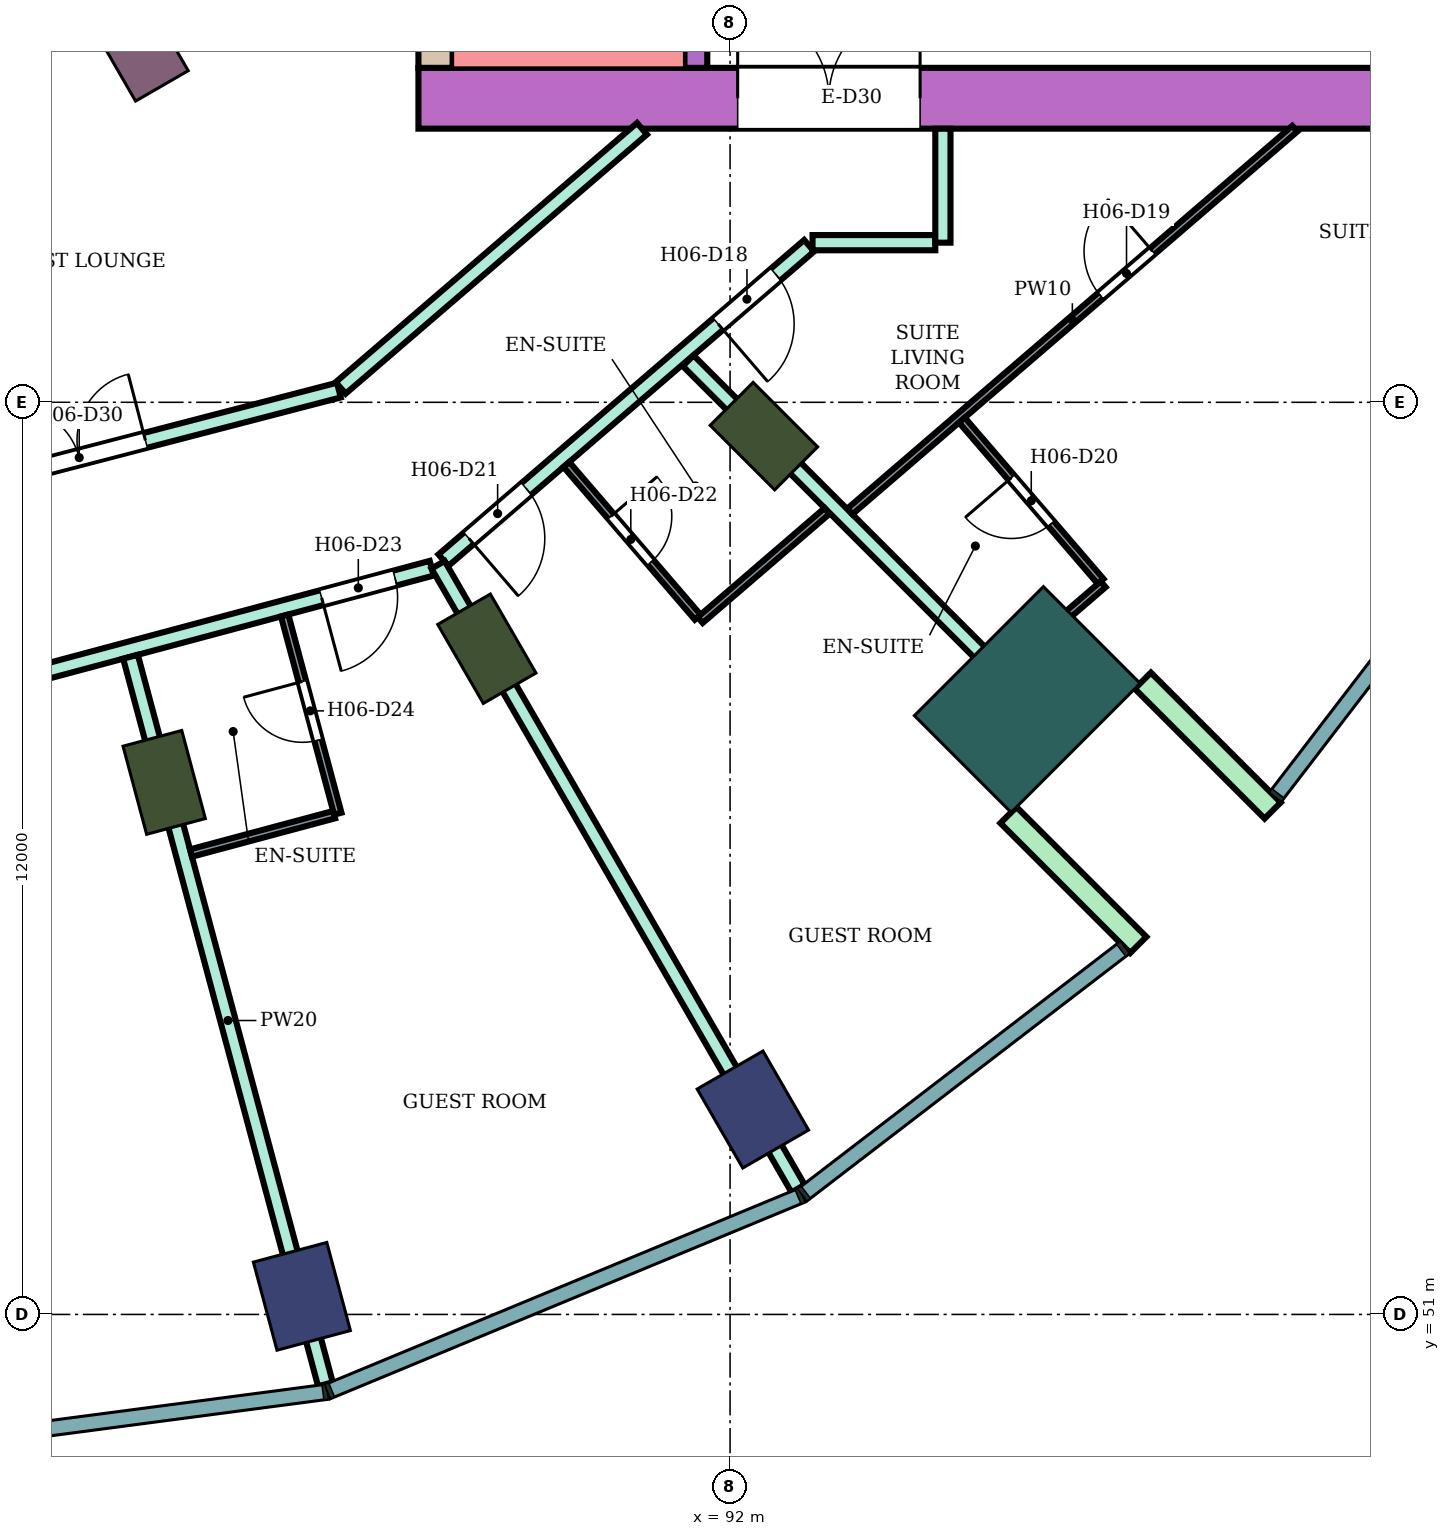
"""IFC4 building model, lengths in metres.
Left out: names, types, materials, properties, quantities, classifications, styles, units other than length and angle.
Written with IfcOpenShell. Run it as: python <this file> out.ifc"""

import sys

from ifc_helpers import new_model, si_unit, direction, frame, frame_2d, origin, origin_2d, place, context, subcontext, project, spatial, rectangle, extrude, element, fill, save


model = new_model("IFC4")
c1 = context("Model", 3, precision=1e-05, world=origin(), true_north=direction((0.0, 1.0)))
c2 = subcontext(c1, "Body", "Model", "MODEL_VIEW")
j1 = project(units=[si_unit("LENGTHUNIT", "METRE"), si_unit("PLANEANGLEUNIT", "RADIAN")], contexts=[c1])
p1 = place(None, origin())
s1 = spatial("IfcSite", under=j1, at=p1, CompositionType="ELEMENT")
p2 = place(p1, origin())
s2 = spatial("IfcBuilding", under=s1, at=p2, CompositionType="ELEMENT")
p3 = place(p2, frame((0.0, 0.0, 93.8)))
s3 = spatial("IfcBuildingStorey", under=s2, at=p3, CompositionType="ELEMENT", Elevation=93.8)
for number, where, z_axis, x_axis in (
    (1, (86.367, 51.238, 0.0), (0.0, 0.0, 1.0), (0.259, -0.966, 0.0)),
    (2, (92.3, 53.696, 0.0), (0.0, 0.0, 1.0), (0.5, -0.866, 0.0)),
):
    element("IfcColumn", number, at=place(p3, frame(where, z_axis=z_axis, x_axis=x_axis)), inside=s3, PredefinedType="COLUMN", context=c2, shape_type="SweptSolid", body=[
        extrude(rectangle(XDim=1.2, YDim=1.0, at=origin_2d()), origin(), (0.0, 0.0, 1.0), 3.8),
    ])
for number, where, z_axis, x_axis in (
    (3, (84.555, 58.0, 0.0), (0.0, 0.0, 1.0), (0.259, -0.966, 0.0)),
    (4, (88.8, 59.758, 0.0), (0.0, 0.0, 1.0), (0.5, -0.866, 0.0)),
    (5, (92.445, 62.555, 0.0), (0.0, 0.0, 1.0), (0.707, -0.707, 0.0)),
):
    element("IfcColumn", number, at=place(p3, frame(where, z_axis=z_axis, x_axis=x_axis)), inside=s3, PredefinedType="COLUMN", context=c2, shape_type="SweptSolid", body=[
        extrude(rectangle(XDim=1.2, YDim=0.8, at=origin_2d()), origin(), (0.0, 0.0, 1.0), 3.8),
    ])
p4 = place(p3, frame((84.3, 67.552, 0.0), z_axis=(0.0, 0.0, 1.0), x_axis=(0.5, -0.866025403784, 0.0)))
e6 = element("IfcColumn", 6, at=p4, inside=s3, PredefinedType="COLUMN", context=c2, shape_type="SweptSolid", body=[
    extrude(rectangle(XDim=0.9, YDim=0.8, at=origin_2d()), origin(), (0.0, 0.0, 1.0), 3.8),
])
p5 = place(p3, frame((95.91, 59.09, 0.0), z_axis=(0.0, 0.0, 1.0), x_axis=(0.707106781187, -0.707106781187, 0.0)))
e7 = element("IfcColumn", 7, at=p5, inside=s3, PredefinedType="COLUMN", context=c2, shape_type="SweptSolid", body=[
    extrude(rectangle(XDim=1.8, YDim=2.4, at=origin_2d()), origin(), (0.0, 0.0, 1.0), 3.8),
])
p6 = place(p3, frame((87.9, 67.0, 0.0), z_axis=(0.0, 0.0, 1.0), x_axis=(1.0, 0.0, 0.0)))
e8 = element("IfcWall", 8, at=p6, inside=s3, PredefinedType="SHEAR", context=c2, shape_type="SweptSolid", body=[
    extrude(rectangle(XDim=14.7, YDim=0.8, at=frame_2d((7.35, 0.0))), origin(), (0.0, 0.0, 1.0), 3.48),
])
p7 = place(p6, frame((4.2, 0.0, 0.0)))
e9 = element("IfcOpeningElement", 9, at=p7, cuts=e8, PredefinedType="OPENING", context=c2, shape_type="SweptSolid", body=[
    extrude(rectangle(XDim=2.4, YDim=2.4, at=frame_2d((1.2, 1.2))), frame((0.0, 0.41, 0.0), z_axis=(0.0, -1.0, 0.0), x_axis=(1.0, 0.0, 0.0)), (0.0, 0.0, 1.0), 0.82),
])
p8 = place(p3, frame((88.125, 67.4, 0.0), z_axis=(0.0, 0.0, 1.0), x_axis=(0.0, 1.0, 0.0)))
e10 = element("IfcWall", 10, at=p8, inside=s3, PredefinedType="SHEAR", context=c2, shape_type="SweptSolid", body=[
    extrude(rectangle(XDim=7.6, YDim=0.45, at=frame_2d((3.8, 0.0))), origin(), (0.0, 0.0, 1.0), 3.48),
])
p9 = place(p3, frame((91.55, 67.4, 0.0), z_axis=(0.0, 0.0, 1.0), x_axis=(0.0, 1.0, 0.0)))
e11 = element("IfcWall", 11, at=p9, inside=s3, PredefinedType="SHEAR", context=c2, shape_type="SweptSolid", body=[
    extrude(rectangle(XDim=7.6, YDim=0.3, at=frame_2d((3.8, 0.0))), origin(), (0.0, 0.0, 1.0), 3.48),
])
p10 = place(p9, frame((0.25, 0.0, 0.0)))
e12 = element("IfcOpeningElement", 12, at=p10, cuts=e11, PredefinedType="OPENING", context=c2, shape_type="SweptSolid", body=[
    extrude(rectangle(XDim=0.9, YDim=2.1, at=frame_2d((0.45, 1.05))), frame((0.0, 0.16, 0.0), z_axis=(0.0, -1.0, 0.0), x_axis=(1.0, 0.0, 0.0)), (0.0, 0.0, 1.0), 0.32),
])
for number, where, z_axis, x_axis in (
    (13, (95.662, 57.57, 0.0), (0.0, 0.0, 1.0), (0.707, -0.707, 0.0)),
    (14, (97.43, 59.338, 0.0), (0.0, 0.0, 1.0), (0.707, -0.707, 0.0)),
):
    element("IfcWall", number, at=place(p3, frame(where, z_axis=z_axis, x_axis=x_axis)), inside=s3, PredefinedType="NOTDEFINED", context=c2, shape_type="SweptSolid", body=[
        extrude(rectangle(XDim=2.416, YDim=0.3, at=frame_2d((1.208, 0.0))), origin(), (0.0, 0.0, 1.0), 3.8),
    ])
p11 = place(p3, frame((80.0, 67.396, 0.0), z_axis=(0.0, 0.0, 1.0), x_axis=(0.965933654434, 0.258789828301, 0.0)))
e15 = element("IfcWall", 15, at=p11, inside=s3, PredefinedType="NOTDEFINED", context=c2, shape_type="SweptSolid", body=[
    extrude(rectangle(XDim=3.936, YDim=0.2, at=frame_2d((1.968, 0.0))), origin(), (0.0, 0.0, 1.0), 3.8),
])
p12 = place(p11, frame((0.468, 0.0, 0.9)))
e16 = element("IfcOpeningElement", 16, at=p12, cuts=e15, PredefinedType="OPENING", context=c2, shape_type="SweptSolid", body=[
    extrude(rectangle(XDim=3.0, YDim=2.3, at=frame_2d((1.5, 1.15))), frame((0.0, 0.11, 0.0), z_axis=(0.0, -1.0, 0.0), x_axis=(1.0, 0.0, 0.0)), (0.0, 0.0, 1.0), 0.22),
])
p13 = place(p3, frame((80.119, 61.41, 0.0), z_axis=(0.0, 0.0, 1.0), x_axis=(0.967823361235, 0.251630565408, 0.0)))
e17 = element("IfcWall", 17, at=p13, inside=s3, PredefinedType="PARTITIONING", context=c2, shape_type="SweptSolid", body=[
    extrude(rectangle(XDim=6.958, YDim=0.2, at=frame_2d((3.479, 0.0))), origin(), (0.0, 0.0, 1.0), 3.35),
])
p14 = place(p13, frame((2.529, 0.0, 0.0)))
e18 = element("IfcOpeningElement", 18, at=p14, cuts=e17, PredefinedType="OPENING", context=c2, shape_type="SweptSolid", body=[
    extrude(rectangle(XDim=1.8, YDim=2.1, at=frame_2d((0.9, 1.05))), frame((0.0, 0.11, 0.0), z_axis=(0.0, -1.0, 0.0), x_axis=(1.0, 0.0, 0.0)), (0.0, 0.0, 1.0), 0.22),
])
p15 = place(p3, frame((80.0, 58.655, 0.0), z_axis=(0.0, 0.0, 1.0), x_axis=(0.965967338894, 0.258664068224, 0.0)))
e19 = element("IfcWall", 19, at=p15, inside=s3, PredefinedType="PARTITIONING", context=c2, shape_type="SweptSolid", body=[
    extrude(rectangle(XDim=8.36, YDim=0.2, at=frame_2d((4.18, 0.0))), origin(), (0.0, 0.0, 1.0), 3.35),
])
p16 = place(p15, frame((6.86, 0.0, 0.0)))
e20 = element("IfcOpeningElement", 20, at=p16, cuts=e19, PredefinedType="OPENING", context=c2, shape_type="SweptSolid", body=[
    extrude(rectangle(XDim=1.0, YDim=2.1, at=frame_2d((0.5, 1.05))), frame((0.0, 0.11, 0.0), z_axis=(0.0, -1.0, 0.0), x_axis=(1.0, 0.0, 0.0)), (0.0, 0.0, 1.0), 0.22),
])
p17 = place(p3, frame((84.112, 59.652, 0.0), z_axis=(0.0, 0.0, 1.0), x_axis=(0.258792739659, -0.965932874428, 0.0)))
e21 = element("IfcWall", 21, at=p17, inside=s3, PredefinedType="PARTITIONING", context=c2, shape_type="SweptSolid", body=[
    extrude(rectangle(XDim=9.908, YDim=0.2, at=frame_2d((4.954, 0.0))), origin(), (0.0, 0.0, 1.0), 3.35),
])
p18 = place(p3, frame((86.877, 63.189, 0.0), z_axis=(0.0, 0.0, 1.0), x_axis=(0.758088707506, 0.652151448325, 0.0)))
e22 = element("IfcWall", 22, at=p18, inside=s3, PredefinedType="PARTITIONING", context=c2, shape_type="SweptSolid", body=[
    extrude(rectangle(XDim=5.229, YDim=0.2, at=frame_2d((2.615, 0.0))), origin(), (0.0, 0.0, 1.0), 3.35),
])
p19 = place(p3, frame((88.229, 60.923, 0.0), z_axis=(0.0, 0.0, 1.0), x_axis=(0.758220952094, 0.651997690031, 0.0)))
e23 = element("IfcWall", 23, at=p19, inside=s3, PredefinedType="PARTITIONING", context=c2, shape_type="SweptSolid", body=[
    extrude(rectangle(XDim=6.346, YDim=0.2, at=frame_2d((3.173, 0.0))), origin(), (0.0, 0.0, 1.0), 3.35),
])
p20 = place(p19, frame((4.767, 0.0, 0.0)))
e24 = element("IfcOpeningElement", 24, at=p20, cuts=e23, PredefinedType="OPENING", context=c2, shape_type="SweptSolid", body=[
    extrude(rectangle(XDim=1.0, YDim=2.1, at=frame_2d((0.5, 1.05))), frame((0.0, 0.11, 0.0), z_axis=(0.0, -1.0, 0.0), x_axis=(1.0, 0.0, 0.0)), (0.0, 0.0, 1.0), 0.22),
])
p21 = place(p19, frame((0.44, 0.0, 0.0)))
e25 = element("IfcOpeningElement", 25, at=p21, cuts=e23, PredefinedType="OPENING", context=c2, shape_type="SweptSolid", body=[
    extrude(rectangle(XDim=1.0, YDim=2.1, at=frame_2d((0.5, 1.05))), frame((0.0, 0.11, 0.0), z_axis=(0.0, -1.0, 0.0), x_axis=(1.0, 0.0, 0.0)), (0.0, 0.0, 1.0), 0.22),
])
p22 = place(p3, frame((88.158, 60.862, 0.0), z_axis=(0.0, 0.0, 1.0), x_axis=(0.499916512745, -0.866073599808, 0.0)))
e26 = element("IfcWall", 26, at=p22, inside=s3, PredefinedType="PARTITIONING", context=c2, shape_type="SweptSolid", body=[
    extrude(rectangle(XDim=9.475, YDim=0.2, at=frame_2d((4.737, 0.0))), origin(), (0.0, 0.0, 1.0), 3.35),
])
p23 = place(p3, frame((91.448, 63.547, 0.0), z_axis=(0.0, 0.0, 1.0), x_axis=(0.706949958062, -0.707263569538, 0.0)))
e27 = element("IfcWall", 27, at=p23, inside=s3, PredefinedType="PARTITIONING", context=c2, shape_type="SweptSolid", body=[
    extrude(rectangle(XDim=7.006, YDim=0.2, at=frame_2d((3.503, 0.0))), origin(), (0.0, 0.0, 1.0), 3.35),
])
p24 = place(p3, frame((93.085, 65.1, 0.0), z_axis=(0.0, 0.0, 1.0), x_axis=(1.0, 0.0, 0.0)))
e28 = element("IfcWall", 28, at=p24, inside=s3, PredefinedType="PARTITIONING", context=c2, shape_type="SweptSolid", body=[
    extrude(rectangle(XDim=1.615, YDim=0.2, at=frame_2d((0.808, 0.0))), origin(), (0.0, 0.0, 1.0), 3.35),
])
p25 = place(p3, frame((94.8, 65.1, 0.0), z_axis=(0.0, 0.0, 1.0), x_axis=(0.0, 1.0, 0.0)))
e29 = element("IfcWall", 29, at=p25, inside=s3, PredefinedType="PARTITIONING", context=c2, shape_type="SweptSolid", body=[
    extrude(rectangle(XDim=1.499, YDim=0.2, at=frame_2d((0.75, 0.0))), origin(), (0.0, 0.0, 1.0), 3.35),
])
p26 = place(p3, frame((84.908, 57.07, 0.0), z_axis=(0.0, 0.0, 1.0), x_axis=(0.965853538138, 0.25908867761, 0.0)))
e30 = element("IfcWall", 30, at=p26, inside=s3, PredefinedType="PARTITIONING", context=c2, shape_type="SweptSolid", body=[
    extrude(rectangle(XDim=1.95, YDim=0.1, at=frame_2d((0.975, 0.0))), origin(), (0.0, 0.0, 1.0), 3.35),
])
p27 = place(p3, frame((86.14, 60.196, 0.0), z_axis=(0.0, 0.0, 1.0), x_axis=(0.258945475746, -0.965891940432, 0.0)))
e31 = element("IfcWall", 31, at=p27, inside=s3, PredefinedType="PARTITIONING", context=c2, shape_type="SweptSolid", body=[
    extrude(rectangle(XDim=2.7, YDim=0.1, at=frame_2d((1.35, 0.0))), origin(), (0.0, 0.0, 1.0), 3.35),
])
p28 = place(p27, frame((0.9, 0.0, 0.0)))
e32 = element("IfcOpeningElement", 32, at=p28, cuts=e31, PredefinedType="OPENING", context=c2, shape_type="SweptSolid", body=[
    extrude(rectangle(XDim=0.8, YDim=2.1, at=frame_2d((0.4, 1.05))), frame((0.0, 0.06, 0.0), z_axis=(0.0, -1.0, 0.0), x_axis=(1.0, 0.0, 0.0)), (0.0, 0.0, 1.0), 0.12),
])
p29 = place(p3, frame((89.846, 62.182, 0.0), z_axis=(0.0, 0.0, 1.0), x_axis=(0.652095405055, -0.758136915541, 0.0)))
e33 = element("IfcWall", 33, at=p29, inside=s3, PredefinedType="PARTITIONING", context=c2, shape_type="SweptSolid", body=[
    extrude(rectangle(XDim=2.65, YDim=0.1, at=frame_2d((1.325, 0.0))), origin(), (0.0, 0.0, 1.0), 3.35),
])
p30 = place(p29, frame((0.9, 0.0, 0.0)))
e34 = element("IfcOpeningElement", 34, at=p30, cuts=e33, PredefinedType="OPENING", context=c2, shape_type="SweptSolid", body=[
    extrude(rectangle(XDim=0.8, YDim=2.1, at=frame_2d((0.4, 1.05))), frame((0.0, 0.06, 0.0), z_axis=(0.0, -1.0, 0.0), x_axis=(1.0, 0.0, 0.0)), (0.0, 0.0, 1.0), 0.12),
])
p31 = place(p3, frame((91.607, 60.135, 0.0), z_axis=(0.0, 0.0, 1.0), x_axis=(0.758135842672, 0.652096652388, 0.0)))
e35 = element("IfcWall", 35, at=p31, inside=s3, PredefinedType="PARTITIONING", context=c2, shape_type="SweptSolid", body=[
    extrude(rectangle(XDim=2.201, YDim=0.1, at=frame_2d((1.101, 0.0))), origin(), (0.0, 0.0, 1.0), 3.35),
])
p32 = place(p3, frame((93.577, 61.565, 0.0), z_axis=(0.0, 0.0, 1.0), x_axis=(0.75812140399, 0.652113438607, 0.0)))
e36 = element("IfcWall", 36, at=p32, inside=s3, PredefinedType="PARTITIONING", context=c2, shape_type="SweptSolid", body=[
    extrude(rectangle(XDim=7.72, YDim=0.1, at=frame_2d((3.86, 0.0))), origin(), (0.0, 0.0, 1.0), 3.35),
])
p33 = place(p32, frame((4.35, 0.0, 0.0)))
e37 = element("IfcOpeningElement", 37, at=p33, cuts=e36, PredefinedType="OPENING", context=c2, shape_type="SweptSolid", body=[
    extrude(rectangle(XDim=0.9, YDim=2.1, at=frame_2d((0.45, 1.05))), frame((0.0, 0.06, 0.0), z_axis=(0.0, -1.0, 0.0), x_axis=(1.0, 0.0, 0.0)), (0.0, 0.0, 1.0), 0.12),
])
p34 = place(p3, frame((95.05, 62.766, 0.0), z_axis=(0.0, 0.0, 1.0), x_axis=(0.652190642827, -0.75805498838, 0.0)))
e38 = element("IfcWall", 38, at=p34, inside=s3, PredefinedType="PARTITIONING", context=c2, shape_type="SweptSolid", body=[
    extrude(rectangle(XDim=2.8, YDim=0.1, at=frame_2d((1.4, 0.0))), origin(), (0.0, 0.0, 1.0), 3.35),
])
p35 = place(p34, frame((1.0, 0.0, 0.0)))
e39 = element("IfcOpeningElement", 39, at=p35, cuts=e38, PredefinedType="OPENING", context=c2, shape_type="SweptSolid", body=[
    extrude(rectangle(XDim=0.8, YDim=2.1, at=frame_2d((0.4, 1.05))), frame((0.0, 0.06, 0.0), z_axis=(0.0, -1.0, 0.0), x_axis=(1.0, 0.0, 0.0)), (0.0, 0.0, 1.0), 0.12),
])
p36 = place(p3, frame((95.634, 59.509, 0.0), z_axis=(0.0, 0.0, 1.0), x_axis=(0.757922369717, 0.652344756614, 0.0)))
e40 = element("IfcWall", 40, at=p36, inside=s3, PredefinedType="PARTITIONING", context=c2, shape_type="SweptSolid", body=[
    extrude(rectangle(XDim=1.681, YDim=0.1, at=frame_2d((0.841, 0.0))), origin(), (0.0, 0.0, 1.0), 3.35),
])
p37 = place(p12, origin())
e41 = element("IfcWindow", 41, at=p37, inside=s3, PartitioningType="SINGLE_PANEL", PredefinedType="WINDOW", context=c2, shape_type="SweptSolid", body=[
    extrude(rectangle(XDim=3.0, YDim=2.3, at=frame_2d((1.5, 1.15))), frame((0.0, 0.03, 0.0), z_axis=(0.0, -1.0, 0.0), x_axis=(1.0, 0.0, 0.0)), (0.0, 0.0, 1.0), 0.06),
])
fill(e16, e41)
p38 = place(p20, frame((1.0, 0.0, 0.0), z_axis=(0.0, 0.0, 1.0), x_axis=(-1.0, 0.0, 0.0)))
e42 = element("IfcDoor", 42, at=p38, inside=s3, OperationType="SINGLE_SWING_RIGHT", PredefinedType="DOOR", context=c2, shape_type="SweptSolid", body=[
    extrude(rectangle(XDim=1.0, YDim=2.1, at=frame_2d((0.5, 1.05))), frame((0.0, 0.025, 0.0), z_axis=(0.0, -1.0, 0.0), x_axis=(1.0, 0.0, 0.0)), (0.0, 0.0, 1.0), 0.05),
])
fill(e24, e42)
p39 = place(p33, origin())
e43 = element("IfcDoor", 43, at=p39, inside=s3, OperationType="SINGLE_SWING_RIGHT", PredefinedType="DOOR", context=c2, shape_type="SweptSolid", body=[
    extrude(rectangle(XDim=0.9, YDim=2.1, at=frame_2d((0.45, 1.05))), frame((0.0, 0.025, 0.0), z_axis=(0.0, -1.0, 0.0), x_axis=(1.0, 0.0, 0.0)), (0.0, 0.0, 1.0), 0.05),
])
fill(e37, e43)
p40 = place(p35, frame((0.8, 0.0, 0.0), z_axis=(0.0, 0.0, 1.0), x_axis=(-1.0, 0.0, 0.0)))
e44 = element("IfcDoor", 44, at=p40, inside=s3, OperationType="SINGLE_SWING_RIGHT", PredefinedType="DOOR", context=c2, shape_type="SweptSolid", body=[
    extrude(rectangle(XDim=0.8, YDim=2.1, at=frame_2d((0.4, 1.05))), frame((0.0, 0.025, 0.0), z_axis=(0.0, -1.0, 0.0), x_axis=(1.0, 0.0, 0.0)), (0.0, 0.0, 1.0), 0.05),
])
fill(e39, e44)
p41 = place(p21, frame((1.0, 0.0, 0.0), z_axis=(0.0, 0.0, 1.0), x_axis=(-1.0, 0.0, 0.0)))
e45 = element("IfcDoor", 45, at=p41, inside=s3, OperationType="SINGLE_SWING_RIGHT", PredefinedType="DOOR", context=c2, shape_type="SweptSolid", body=[
    extrude(rectangle(XDim=1.0, YDim=2.1, at=frame_2d((0.5, 1.05))), frame((0.0, 0.025, 0.0), z_axis=(0.0, -1.0, 0.0), x_axis=(1.0, 0.0, 0.0)), (0.0, 0.0, 1.0), 0.05),
])
fill(e25, e45)
p42 = place(p30, origin())
e46 = element("IfcDoor", 46, at=p42, inside=s3, OperationType="SINGLE_SWING_LEFT", PredefinedType="DOOR", context=c2, shape_type="SweptSolid", body=[
    extrude(rectangle(XDim=0.8, YDim=2.1, at=frame_2d((0.4, 1.05))), frame((0.0, 0.025, 0.0), z_axis=(0.0, -1.0, 0.0), x_axis=(1.0, 0.0, 0.0)), (0.0, 0.0, 1.0), 0.05),
])
fill(e34, e46)
p43 = place(p16, frame((1.0, 0.0, 0.0), z_axis=(0.0, 0.0, 1.0), x_axis=(-1.0, 0.0, 0.0)))
e47 = element("IfcDoor", 47, at=p43, inside=s3, OperationType="SINGLE_SWING_RIGHT", PredefinedType="DOOR", context=c2, shape_type="SweptSolid", body=[
    extrude(rectangle(XDim=1.0, YDim=2.1, at=frame_2d((0.5, 1.05))), frame((0.0, 0.025, 0.0), z_axis=(0.0, -1.0, 0.0), x_axis=(1.0, 0.0, 0.0)), (0.0, 0.0, 1.0), 0.05),
])
fill(e20, e47)
p44 = place(p28, frame((0.8, 0.0, 0.0), z_axis=(0.0, 0.0, 1.0), x_axis=(-1.0, 0.0, 0.0)))
e48 = element("IfcDoor", 48, at=p44, inside=s3, OperationType="SINGLE_SWING_RIGHT", PredefinedType="DOOR", context=c2, shape_type="SweptSolid", body=[
    extrude(rectangle(XDim=0.8, YDim=2.1, at=frame_2d((0.4, 1.05))), frame((0.0, 0.025, 0.0), z_axis=(0.0, -1.0, 0.0), x_axis=(1.0, 0.0, 0.0)), (0.0, 0.0, 1.0), 0.05),
])
fill(e32, e48)
p45 = place(p14, origin())
e49 = element("IfcDoor", 49, at=p45, inside=s3, OperationType="DOUBLE_DOOR_SINGLE_SWING", PredefinedType="DOOR", context=c2, shape_type="SweptSolid", body=[
    extrude(rectangle(XDim=1.8, YDim=2.1, at=frame_2d((0.9, 1.05))), frame((0.0, 0.025, 0.0), z_axis=(0.0, -1.0, 0.0), x_axis=(1.0, 0.0, 0.0)), (0.0, 0.0, 1.0), 0.05),
])
fill(e18, e49)
p46 = place(p7, origin())
e50 = element("IfcDoor", 50, at=p46, inside=s3, OperationType="DOUBLE_DOOR_SINGLE_SWING", PredefinedType="DOOR", context=c2, shape_type="SweptSolid", body=[
    extrude(rectangle(XDim=2.4, YDim=2.4, at=frame_2d((1.2, 1.2))), frame((0.0, 0.025, 0.0), z_axis=(0.0, -1.0, 0.0), x_axis=(1.0, 0.0, 0.0)), (0.0, 0.0, 1.0), 0.05),
])
fill(e9, e50)
save(model, sys.argv[1])
